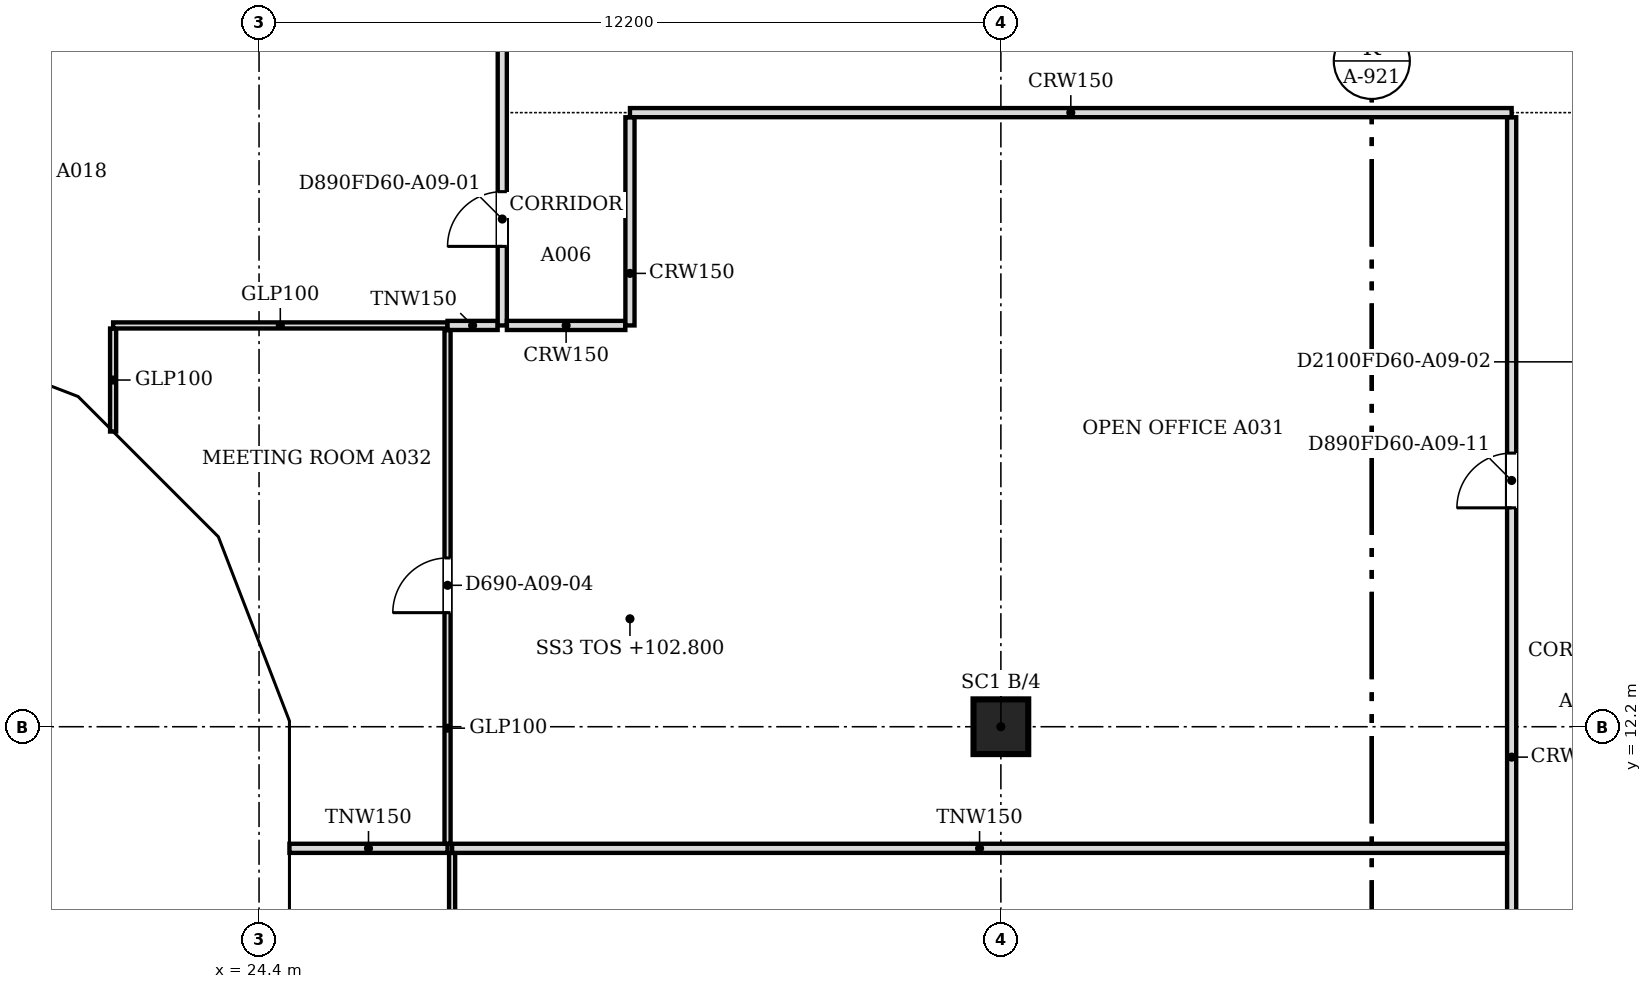
"""IFC4 building model, lengths in metres.
Left out: names, types, materials, properties, quantities, classifications, styles, units other than length and angle.
Written with IfcOpenShell. Run it as: python <this file> out.ifc"""

import sys

from ifc_helpers import new_model, si_unit, direction, frame, frame_2d, origin, origin_2d, place, context, subcontext, project, spatial, polyline, rectangle, outline, extrude, faceted_brep, source, transform, mapped, element, fill, save


model = new_model("IFC4")
c1 = context("Model", 3, precision=1e-05, world=origin(), true_north=direction((0.0, 1.0)))
c2 = subcontext(c1, "Body", "Model", "MODEL_VIEW")
j1 = project(units=[si_unit("LENGTHUNIT", "METRE"), si_unit("PLANEANGLEUNIT", "RADIAN")], contexts=[c1])
p1 = place(None, origin())
s1 = spatial("IfcSite", under=j1, at=p1, CompositionType="ELEMENT")
p2 = place(p1, origin())
s2 = spatial("IfcBuilding", under=s1, at=p2, CompositionType="ELEMENT")
p3 = place(p2, frame((0.0, 0.0, 102.8)))
s3 = spatial("IfcBuildingStorey", under=s2, at=p3, CompositionType="ELEMENT", Elevation=102.8)
p4 = place(p3, frame((36.6, 12.2, 0.0), z_axis=(0.0, 0.0, 1.0), x_axis=(1.0, 0.0, 0.0)))
e1 = element("IfcColumn", 1, at=p4, inside=s3, PredefinedType="COLUMN", context=c2, shape_type="SweptSolid", body=[
    extrude(rectangle(XDim=0.9, YDim=0.9, at=origin_2d()), origin(), (0.0, 0.0, 1.0), 3.55),
])
m1 = source(origin(), c2, "Body", "Brep", [
    faceted_brep([(3.096, -0.25, 7.536), (0.047, -0.25, 3.856), (0.047, -0.25, 3.744), (3.096, -0.25, 0.064), (0.0, 0.25, 3.8), (3.149, 0.25, 7.6), (3.202, 0.25, 7.536), (3.202, 0.25, 0.064), (3.149, 0.25, 0.0), (3.149, -0.0, 0.0), (3.149, -0.0, 7.6), (0.0, 0.0, 3.8)], [[[0, 1, 2, 3]], [[4, 5, 6, 7, 8]], [[8, 7, 9]], [[6, 5, 10]], [[5, 4, 11, 1, 0, 10]], [[4, 8, 9, 3, 2, 11]], [[11, 2, 1]], [[3, 9, 7, 6, 10, 0]]]),
])
p5 = place(p3, frame((18.346, 18.55, -3.8), z_axis=(0.0, 0.0, 1.0), x_axis=(0.932985567668, -0.359913782069, 0.0)))
e2 = element("IfcWall", 2, at=p5, inside=s3, PredefinedType="SOLIDWALL", context=c2, shape_type="MappedRepresentation", body=[
    mapped(m1, transform((0.0, 0.0, 0.0), scale=1.0)),
])
m2 = source(origin(), c2, "Body", "SweptSolid", [
    extrude(outline(polyline([(2.949, 6.967), (0.325, 3.8), (2.949, 0.633), (2.949, 6.967)])), frame((0.0, 0.26, 0.0), z_axis=(0.0, -1.0, 0.0), x_axis=(1.0, 0.0, 0.0)), (0.0, 0.0, 1.0), 0.52),
])
p6 = place(p5, origin())
e3 = element("IfcOpeningElement", 3, at=p6, cuts=e2, PredefinedType="OPENING", context=c2, shape_type="MappedRepresentation", body=[
    mapped(m2, transform((0.0, 0.0, 0.0), scale=1.0)),
])
m3 = source(origin(), c2, "Body", "Brep", [
    faceted_brep([(0.106, -0.25, 0.064), (3.156, -0.25, 3.736), (3.156, -0.25, 3.864), (0.106, -0.25, 7.536), (0.0, 0.25, 7.536), (0.053, 0.25, 7.6), (3.209, 0.25, 3.8), (0.053, 0.25, 0.0), (0.0, 0.25, 0.064), (3.209, -0.0, 3.8), (0.053, 0.0, 0.0), (0.053, 0.0, 7.6)], [[[0, 1, 2, 3]], [[4, 5, 6, 7, 8]], [[7, 6, 9, 1, 0, 10]], [[6, 5, 11, 3, 2, 9]], [[5, 4, 11]], [[8, 7, 10]], [[8, 10, 0, 3, 11, 4]], [[1, 9, 2]]]),
])
p7 = place(p3, frame((21.248, 17.454, -3.8), z_axis=(0.0, 0.0, 1.0), x_axis=(0.707106781187, -0.707106781187, 0.0)))
e4 = element("IfcWall", 4, at=p7, inside=s3, PredefinedType="SOLIDWALL", context=c2, shape_type="MappedRepresentation", body=[
    mapped(m3, transform((0.0, 0.0, 0.0), scale=1.0)),
])
m4 = source(origin(), c2, "Body", "SweptSolid", [
    extrude(outline(polyline([(0.253, 0.632), (2.884, 3.8), (0.253, 6.968), (0.253, 0.632)])), frame((0.0, 0.26, 0.0), z_axis=(0.0, -1.0, 0.0), x_axis=(1.0, 0.0, 0.0)), (0.0, 0.0, 1.0), 0.52),
])
p8 = place(p7, origin())
e5 = element("IfcOpeningElement", 5, at=p8, cuts=e4, PredefinedType="OPENING", context=c2, shape_type="MappedRepresentation", body=[
    mapped(m4, transform((0.0, 0.0, 0.0), scale=1.0)),
])
m5 = source(origin(), c2, "Body", "Brep", [
    faceted_brep([(3.103, -0.25, 7.544), (0.053, -0.25, 3.864), (0.053, -0.25, 3.736), (3.103, -0.25, 0.056), (0.0, 0.25, 3.8), (3.149, 0.25, 7.6), (3.196, 0.25, 7.543), (3.196, 0.25, 0.057), (3.149, 0.25, 0.0), (3.149, -0.0, 0.0), (3.149, -0.0, 7.6), (0.0, 0.0, 3.8)], [[[0, 1, 2, 3]], [[4, 5, 6, 7, 8]], [[8, 7, 9]], [[6, 5, 10]], [[5, 4, 11, 1, 0, 10]], [[4, 8, 9, 3, 2, 11]], [[11, 2, 1]], [[3, 9, 7, 6, 10, 0]]]),
])
p9 = place(p3, frame((23.517, 15.185, -3.8), z_axis=(0.0, 0.0, 1.0), x_axis=(0.359864468756, -0.933004589553, 0.0)))
e6 = element("IfcWall", 6, at=p9, inside=s3, PredefinedType="SOLIDWALL", context=c2, shape_type="MappedRepresentation", body=[
    mapped(m5, transform((0.0, 0.0, 0.0), scale=1.0)),
])
p10 = place(p9, origin())
e7 = element("IfcOpeningElement", 7, at=p10, cuts=e6, PredefinedType="OPENING", context=c2, shape_type="MappedRepresentation", body=[
    mapped(m2, transform((0.0, 0.0, 0.0), scale=1.0)),
])
m6 = source(origin(), c2, "Body", "Brep", [
    faceted_brep([(0.093, -0.25, 0.057), (3.143, -0.25, 3.8), (0.093, -0.25, 7.543), (0.0, 0.25, 7.544), (0.047, 0.25, 7.6), (3.143, 0.25, 3.8), (0.047, 0.25, 0.0), (0.0, 0.25, 0.056), (0.047, 0.0, 0.0), (0.047, 0.0, 7.6)], [[[0, 1, 2]], [[3, 4, 5, 6, 7]], [[6, 5, 1, 0, 8]], [[5, 4, 9, 2, 1]], [[4, 3, 9]], [[7, 6, 8]], [[7, 8, 0, 2, 9, 3]]]),
])
p11 = place(p3, frame((24.65, 12.293, -3.8), z_axis=(0.0, 0.0, 1.0), x_axis=(0.0, -1.0, 0.0)))
e8 = element("IfcWall", 8, at=p11, inside=s3, PredefinedType="SOLIDWALL", context=c2, shape_type="MappedRepresentation", body=[
    mapped(m6, transform((0.0, 0.0, 0.0), scale=1.0)),
])
m7 = source(origin(), c2, "Body", "SweptSolid", [
    extrude(outline(polyline([(0.247, 0.641), (2.821, 3.8), (0.247, 6.959), (0.247, 0.641)])), frame((0.0, 0.26, 0.0), z_axis=(0.0, -1.0, 0.0), x_axis=(1.0, 0.0, 0.0)), (0.0, 0.0, 1.0), 0.52),
])
p12 = place(p11, origin())
e9 = element("IfcOpeningElement", 9, at=p12, cuts=e8, PredefinedType="OPENING", context=c2, shape_type="MappedRepresentation", body=[
    mapped(m7, transform((0.0, 0.0, 0.0), scale=1.0)),
])
m8 = source(origin(), c2, "Body", "Brep", [
    faceted_brep([(0.093, -0.25, 0.056), (3.143, -0.25, 3.736), (3.143, -0.25, 3.8), (0.093, -0.25, 3.8), (0.0, 0.25, 3.8), (3.196, 0.25, 3.8), (0.047, 0.25, 0.0), (0.0, 0.25, 0.057), (3.196, -0.0, 3.8), (0.047, 0.0, 0.0)], [[[0, 1, 2, 3]], [[4, 5, 6, 7]], [[6, 5, 8, 1, 0, 9]], [[5, 4, 3, 2, 8]], [[7, 6, 9]], [[7, 9, 0, 3, 4]], [[1, 8, 2]]]),
])
p13 = place(p3, frame((18.303, 18.567, 0.0), z_axis=(0.0, 0.0, 1.0), x_axis=(0.932978940178, -0.359930961693, 0.0)))
e10 = element("IfcWall", 10, at=p13, inside=s3, PredefinedType="SOLIDWALL", context=c2, shape_type="MappedRepresentation", body=[
    mapped(m8, transform((0.0, 0.0, 0.0), scale=1.0)),
])
m9 = source(origin(), c2, "Body", "SweptSolid", [
    extrude(outline(polyline([(0.247, 0.633), (2.664, 3.55), (0.247, 3.55), (0.247, 0.633)])), frame((0.0, 0.26, 0.0), z_axis=(0.0, -1.0, 0.0), x_axis=(1.0, 0.0, 0.0)), (0.0, 0.0, 1.0), 0.52),
])
p14 = place(p13, origin())
e11 = element("IfcOpeningElement", 11, at=p14, cuts=e10, PredefinedType="OPENING", context=c2, shape_type="MappedRepresentation", body=[
    mapped(m9, transform((0.0, 0.0, 0.0), scale=1.0)),
])
m10 = source(origin(), c2, "Body", "Brep", [
    faceted_brep([(3.103, -0.25, 3.8), (0.053, -0.25, 3.8), (0.053, -0.25, 3.736), (3.103, -0.25, 0.064), (0.0, 0.25, 3.8), (3.209, 0.25, 3.8), (3.209, 0.25, 0.064), (3.156, 0.25, 0.0), (3.156, -0.0, 0.0), (0.0, 0.0, 3.8)], [[[0, 1, 2, 3]], [[4, 5, 6, 7]], [[7, 6, 8]], [[5, 4, 9, 1, 0]], [[4, 7, 8, 3, 2, 9]], [[2, 1, 9]], [[3, 8, 6, 5, 0]]]),
])
p15 = place(p3, frame((21.285, 17.417, 0.0), z_axis=(0.0, 0.0, 1.0), x_axis=(0.707106781187, -0.707106781187, 0.0)))
e12 = element("IfcWall", 12, at=p15, inside=s3, PredefinedType="SOLIDWALL", context=c2, shape_type="MappedRepresentation", body=[
    mapped(m10, transform((0.0, 0.0, 0.0), scale=1.0)),
])
m11 = source(origin(), c2, "Body", "SweptSolid", [
    extrude(outline(polyline([(2.956, 3.55), (0.533, 3.55), (2.956, 0.632), (2.956, 3.55)])), frame((0.0, 0.26, 0.0), z_axis=(0.0, -1.0, 0.0), x_axis=(1.0, 0.0, 0.0)), (0.0, 0.0, 1.0), 0.52),
])
p16 = place(p15, origin())
e13 = element("IfcOpeningElement", 13, at=p16, cuts=e12, PredefinedType="OPENING", context=c2, shape_type="MappedRepresentation", body=[
    mapped(m11, transform((0.0, 0.0, 0.0), scale=1.0)),
])
m12 = source(origin(), c2, "Body", "Brep", [
    faceted_brep([(0.106, -0.25, 0.064), (3.156, -0.25, 3.744), (3.156, -0.25, 3.8), (0.106, -0.25, 3.8), (0.0, 0.25, 3.8), (3.202, 0.25, 3.8), (0.053, 0.25, 0.0), (0.0, 0.25, 0.064), (3.202, -0.0, 3.8), (0.053, 0.0, 0.0)], [[[0, 1, 2, 3]], [[4, 5, 6, 7]], [[6, 5, 8, 1, 0, 9]], [[5, 4, 3, 2, 8]], [[7, 6, 9]], [[7, 9, 0, 3, 4]], [[1, 8, 2]]]),
])
p17 = place(p3, frame((23.497, 15.234, 0.0), z_axis=(0.0, 0.0, 1.0), x_axis=(0.359913782069, -0.932985567668, 0.0)))
e14 = element("IfcWall", 14, at=p17, inside=s3, PredefinedType="SOLIDWALL", context=c2, shape_type="MappedRepresentation", body=[
    mapped(m12, transform((0.0, 0.0, 0.0), scale=1.0)),
])
m13 = source(origin(), c2, "Body", "SweptSolid", [
    extrude(outline(polyline([(0.253, 0.633), (2.671, 3.55), (0.253, 3.55), (0.253, 0.633)])), frame((0.0, 0.26, 0.0), z_axis=(0.0, -1.0, 0.0), x_axis=(1.0, 0.0, 0.0)), (0.0, 0.0, 1.0), 0.52),
])
p18 = place(p17, origin())
e15 = element("IfcOpeningElement", 15, at=p18, cuts=e14, PredefinedType="OPENING", context=c2, shape_type="MappedRepresentation", body=[
    mapped(m13, transform((0.0, 0.0, 0.0), scale=1.0)),
])
m14 = source(origin(), c2, "Body", "Brep", [
    faceted_brep([(3.096, -0.25, 0.0), (6.1, -0.25, 3.8), (0.047, -0.25, 3.8), (0.047, -0.25, 3.743), (0.0, 0.25, 3.8), (6.053, 0.25, 3.8), (6.053, 0.25, 3.741), (3.096, 0.25, 0.0), (6.1, -0.0, 3.8), (0.0, 0.0, 3.8)], [[[0, 1, 2, 3]], [[4, 5, 6, 7]], [[7, 6, 8, 1, 0]], [[5, 4, 9, 2, 1, 8]], [[4, 7, 0, 3, 9]], [[3, 2, 9]], [[6, 5, 8]]]),
])
p19 = place(p3, frame((24.65, 12.247, 0.0), z_axis=(0.0, 0.0, 1.0), x_axis=(0.0, -1.0, 0.0)))
e16 = element("IfcWall", 16, at=p19, inside=s3, PredefinedType="SOLIDWALL", context=c2, shape_type="MappedRepresentation", body=[
    mapped(m14, transform((0.0, 0.0, 0.0), scale=1.0)),
])
m15 = source(origin(), c2, "Body", "SweptSolid", [
    extrude(outline(polyline([(3.094, 0.399), (5.584, 3.55), (0.526, 3.55), (3.094, 0.399)])), frame((0.0, 0.26, 0.0), z_axis=(0.0, -1.0, 0.0), x_axis=(1.0, 0.0, 0.0)), (0.0, 0.0, 1.0), 0.52),
])
p20 = place(p19, origin())
e17 = element("IfcOpeningElement", 17, at=p20, cuts=e16, PredefinedType="OPENING", context=c2, shape_type="MappedRepresentation", body=[
    mapped(m15, transform((0.0, 0.0, 0.0), scale=1.0)),
])
p21 = place(p3, frame((45.0, 0.5, 0.0), z_axis=(0.0, 0.0, 1.0), x_axis=(0.0, 1.0, 0.0)))
e18 = element("IfcWall", 18, at=p21, inside=s3, PredefinedType="PARTITIONING", context=c2, shape_type="SweptSolid", body=[
    extrude(rectangle(XDim=21.724, YDim=0.15, at=frame_2d((10.862, 0.0))), origin(), (0.0, 0.0, 1.0), 2.715),
])
m16 = source(origin(), c2, "Body", "SweptSolid", [
    extrude(rectangle(XDim=0.9, YDim=2.1, at=frame_2d((0.45, 1.05))), frame((0.0, 0.085, 0.0), z_axis=(0.0, -1.0, 0.0), x_axis=(1.0, 0.0, 0.0)), (0.0, 0.0, 1.0), 0.17),
])
p22 = place(p21, frame((6.2, 0.0, 0.0)))
e19 = element("IfcOpeningElement", 19, at=p22, cuts=e18, PredefinedType="OPENING", context=c2, shape_type="MappedRepresentation", body=[
    mapped(m16, transform((0.0, 0.0, 0.0), scale=1.0)),
])
p23 = place(p21, frame((15.3, 0.0, 0.0)))
e20 = element("IfcOpeningElement", 20, at=p23, cuts=e18, PredefinedType="OPENING", context=c2, shape_type="MappedRepresentation", body=[
    mapped(m16, transform((0.0, 0.0, 0.0), scale=1.0)),
])
p24 = place(p3, frame((27.575, 4.2, 0.0), z_axis=(0.0, 0.0, 1.0), x_axis=(0.0, 1.0, 0.0)))
e21 = element("IfcWall", 21, at=p24, inside=s3, PredefinedType="PARTITIONING", context=c2, shape_type="SweptSolid", body=[
    extrude(rectangle(XDim=5.924, YDim=0.1, at=frame_2d((2.962, 0.0))), origin(), (0.0, 0.0, 1.0), 2.715),
])
m17 = source(origin(), c2, "Body", "SweptSolid", [
    extrude(rectangle(XDim=0.9, YDim=2.1, at=frame_2d((0.45, 1.05))), frame((0.0, 0.06, 0.0), z_axis=(0.0, -1.0, 0.0), x_axis=(1.0, 0.0, 0.0)), (0.0, 0.0, 1.0), 0.12),
])
p25 = place(p24, frame((2.5, 0.0, 0.0)))
e22 = element("IfcOpeningElement", 22, at=p25, cuts=e21, PredefinedType="OPENING", context=c2, shape_type="MappedRepresentation", body=[
    mapped(m17, transform((0.0, 0.0, 0.0), scale=1.0)),
])
p26 = place(p3, frame((24.9, 10.2, 0.0), z_axis=(0.0, 0.0, 1.0), x_axis=(1.0, 0.0, 0.0)))
e23 = element("IfcWall", 23, at=p26, inside=s3, PredefinedType="PARTITIONING", context=c2, shape_type="SweptSolid", body=[
    extrude(rectangle(XDim=2.6, YDim=0.15, at=frame_2d((1.3, 0.0))), origin(), (0.0, 0.0, 1.0), 2.715),
])
p27 = place(p3, frame((27.575, 10.2, 0.0), z_axis=(0.0, 0.0, 1.0), x_axis=(1.0, 0.0, 0.0)))
e24 = element("IfcWall", 24, at=p27, inside=s3, PredefinedType="PARTITIONING", context=c2, shape_type="SweptSolid", body=[
    extrude(rectangle(XDim=17.349, YDim=0.15, at=frame_2d((8.675, 0.0))), origin(), (0.0, 0.0, 1.0), 2.715),
])
p28 = place(p3, frame((27.5, 10.276, 0.0), z_axis=(0.0, 0.0, 1.0), x_axis=(0.0, 1.0, 0.0)))
e25 = element("IfcWall", 25, at=p28, inside=s3, PredefinedType="PARTITIONING", context=c2, shape_type="SweptSolid", body=[
    extrude(rectangle(XDim=8.448, YDim=0.1, at=frame_2d((4.224, 0.0))), origin(), (0.0, 0.0, 1.0), 2.715),
])
p29 = place(p28, frame((3.8, 0.0, 0.0)))
e26 = element("IfcOpeningElement", 26, at=p29, cuts=e25, PredefinedType="OPENING", context=c2, shape_type="MappedRepresentation", body=[
    mapped(m17, transform((0.0, 0.0, 0.0), scale=1.0)),
])
p30 = place(p3, frame((22.0, 17.055, 0.0), z_axis=(0.0, 0.0, 1.0), x_axis=(0.0, 1.0, 0.0)))
e27 = element("IfcWall", 27, at=p30, inside=s3, PredefinedType="PARTITIONING", context=c2, shape_type="SweptSolid", body=[
    extrude(rectangle(XDim=1.694, YDim=0.1, at=frame_2d((0.847, 0.0))), origin(), (0.0, 0.0, 1.0), 2.715),
])
p31 = place(p3, frame((22.0, 18.8, 0.0), z_axis=(0.0, 0.0, 1.0), x_axis=(1.0, 0.0, 0.0)))
e28 = element("IfcWall", 28, at=p31, inside=s3, PredefinedType="PARTITIONING", context=c2, shape_type="SweptSolid", body=[
    extrude(rectangle(XDim=5.499, YDim=0.1, at=frame_2d((2.75, 0.0))), origin(), (0.0, 0.0, 1.0), 2.715),
])
p32 = place(p3, frame((27.5, 18.8, 0.0), z_axis=(0.0, 0.0, 1.0), x_axis=(1.0, 0.0, 0.0)))
e29 = element("IfcWall", 29, at=p32, inside=s3, PredefinedType="PARTITIONING", context=c2, shape_type="SweptSolid", body=[
    extrude(rectangle(XDim=0.824, YDim=0.15, at=frame_2d((0.412, 0.0))), origin(), (0.0, 0.0, 1.0), 2.715),
])
p33 = place(p3, frame((28.4, 18.8, 0.0), z_axis=(0.0, 0.0, 1.0), x_axis=(0.0, 1.0, 0.0)))
e30 = element("IfcWall", 30, at=p33, inside=s3, PredefinedType="PARTITIONING", context=c2, shape_type="SweptSolid", body=[
    extrude(rectangle(XDim=26.824, YDim=0.15, at=frame_2d((13.412, 0.0))), origin(), (0.0, 0.0, 1.0), 2.715),
])
p34 = place(p33, frame((1.3, 0.0, 0.0)))
e31 = element("IfcOpeningElement", 31, at=p34, cuts=e30, PredefinedType="OPENING", context=c2, shape_type="MappedRepresentation", body=[
    mapped(m16, transform((0.0, 0.0, 0.0), scale=1.0)),
])
m18 = source(origin(), c2, "Body", "SweptSolid", [
    extrude(rectangle(XDim=1.0, YDim=2.1, at=frame_2d((0.5, 1.05))), frame((0.0, 0.085, 0.0), z_axis=(0.0, -1.0, 0.0), x_axis=(1.0, 0.0, 0.0)), (0.0, 0.0, 1.0), 0.17),
])
p35 = place(p33, frame((23.351, 0.0, 0.0)))
e32 = element("IfcOpeningElement", 32, at=p35, cuts=e30, PredefinedType="OPENING", context=c2, shape_type="MappedRepresentation", body=[
    mapped(m18, transform((0.0, 0.0, 0.0), scale=1.0)),
])
p36 = place(p33, frame((8.2, 0.0, 0.0)))
e33 = element("IfcOpeningElement", 33, at=p36, cuts=e30, PredefinedType="OPENING", context=c2, shape_type="MappedRepresentation", body=[
    mapped(m16, transform((0.0, 0.0, 0.0), scale=1.0)),
])
p37 = place(p33, frame((15.8, 0.0, 0.0)))
e34 = element("IfcOpeningElement", 34, at=p37, cuts=e30, PredefinedType="OPENING", context=c2, shape_type="MappedRepresentation", body=[
    mapped(m18, transform((0.0, 0.0, 0.0), scale=1.0)),
])
p38 = place(p3, frame((28.476, 18.8, 0.0), z_axis=(0.0, 0.0, 1.0), x_axis=(1.0, 0.0, 0.0)))
e35 = element("IfcWall", 35, at=p38, inside=s3, PredefinedType="PARTITIONING", context=c2, shape_type="SweptSolid", body=[
    extrude(rectangle(XDim=1.948, YDim=0.15, at=frame_2d((0.974, 0.0))), origin(), (0.0, 0.0, 1.0), 2.715),
])
p39 = place(p3, frame((30.5, 18.8, 0.0), z_axis=(0.0, 0.0, 1.0), x_axis=(0.0, 1.0, 0.0)))
e36 = element("IfcWall", 36, at=p39, inside=s3, PredefinedType="PARTITIONING", context=c2, shape_type="SweptSolid", body=[
    extrude(rectangle(XDim=3.424, YDim=0.15, at=frame_2d((1.712, 0.0))), origin(), (0.0, 0.0, 1.0), 2.715),
])
p40 = place(p3, frame((30.5, 22.3, 0.0), z_axis=(0.0, 0.0, 1.0), x_axis=(1.0, 0.0, 0.0)))
e37 = element("IfcWall", 37, at=p40, inside=s3, PredefinedType="PARTITIONING", context=c2, shape_type="SweptSolid", body=[
    extrude(rectangle(XDim=14.5, YDim=0.15, at=frame_2d((7.25, 0.0))), origin(), (0.0, 0.0, 1.0), 2.715),
])
m19 = source(origin(), c2, "Body", "SweptSolid", [
    extrude(rectangle(XDim=0.9, YDim=2.1, at=frame_2d((0.45, 1.05))), frame((0.0, 0.025, 0.0), z_axis=(0.0, -1.0, 0.0), x_axis=(1.0, 0.0, 0.0)), (0.0, 0.0, 1.0), 0.05),
])
p41 = place(p34, origin())
e38 = element("IfcDoor", 38, at=p41, inside=s3, OperationType="SINGLE_SWING_LEFT", PredefinedType="DOOR", context=c2, shape_type="MappedRepresentation", body=[
    mapped(m19, transform((0.0, 0.0, 0.0), scale=1.0)),
])
fill(e31, e38)
p42 = place(p29, origin())
e39 = element("IfcDoor", 39, at=p42, inside=s3, OperationType="SINGLE_SWING_LEFT", PredefinedType="DOOR", context=c2, shape_type="MappedRepresentation", body=[
    mapped(m19, transform((0.0, 0.0, 0.0), scale=1.0)),
])
fill(e26, e39)
p43 = place(p23, origin())
e40 = element("IfcDoor", 40, at=p43, inside=s3, OperationType="SINGLE_SWING_LEFT", PredefinedType="DOOR", context=c2, shape_type="MappedRepresentation", body=[
    mapped(m19, transform((0.0, 0.0, 0.0), scale=1.0)),
])
fill(e20, e40)
save(model, sys.argv[1])
